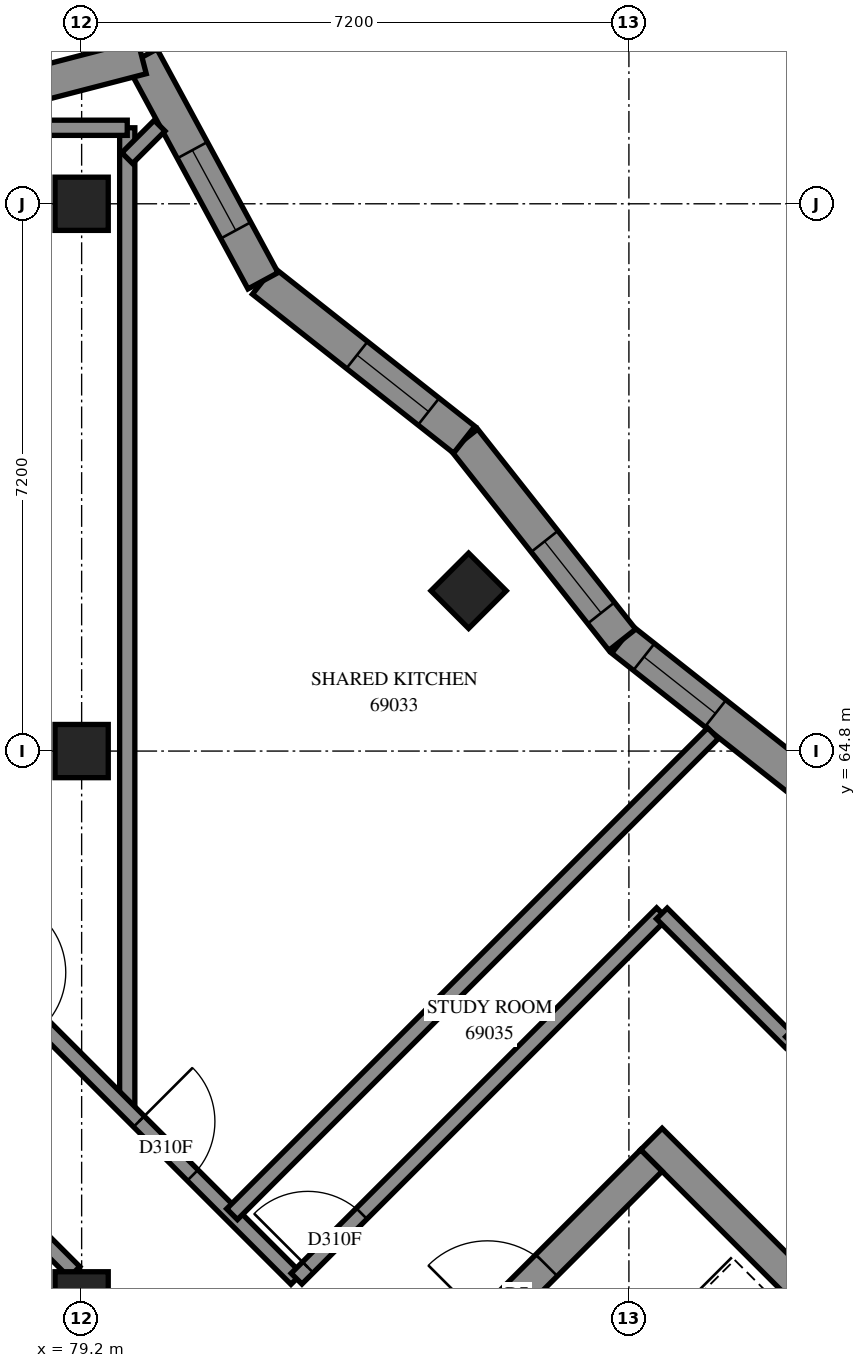
"""IFC4 building model, lengths in metres.
Left out: names, types, materials, properties, quantities, classifications, styles, units other than length and angle.
Written with IfcOpenShell. Run it as: python <this file> out.ifc"""

import sys

from ifc_helpers import new_model, si_unit, direction, frame, frame_2d, origin, origin_2d, place, context, subcontext, project, spatial, polyline, rectangle, outline, extrude, element, fill, save


model = new_model("IFC4")
c1 = context("Model", 3, precision=1e-05, world=origin(), true_north=direction((0.0, 1.0)))
c2 = subcontext(c1, "Body", "Model", "MODEL_VIEW")
j1 = project(units=[si_unit("LENGTHUNIT", "METRE"), si_unit("PLANEANGLEUNIT", "RADIAN")], contexts=[c1])
p1 = place(None, origin())
s1 = spatial("IfcSite", under=j1, at=p1, CompositionType="ELEMENT")
p2 = place(p1, origin())
s2 = spatial("IfcBuilding", under=s1, at=p2, CompositionType="ELEMENT")
p3 = place(p2, frame((0.0, 0.0, 254.0)))
s3 = spatial("IfcBuildingStorey", under=s2, at=p3, CompositionType="ELEMENT", Elevation=254.0)
for number, where, z_axis, x_axis in (
    (1, (79.2, 57.6, 0.0), (0.0, 0.0, 1.0), (1.0, 0.0, 0.0)),
    (2, (79.2, 64.8, 0.0), (0.0, 0.0, 1.0), (1.0, 0.0, 0.0)),
    (3, (79.2, 72.0, 0.0), (0.0, 0.0, 1.0), (1.0, 0.0, 0.0)),
    (4, (84.291, 66.909, 0.0), (0.0, 0.0, 1.0), (0.707, -0.707, 0.0)),
):
    element("IfcColumn", number, at=place(p3, frame(where, z_axis=z_axis, x_axis=x_axis)), inside=s3, PredefinedType="COLUMN", context=c2, shape_type="SweptSolid", body=[
        extrude(rectangle(XDim=0.7, YDim=0.7, at=origin_2d()), origin(), (0.0, 0.0, 1.0), 3.1),
    ])
p4 = place(p3, frame((86.695, 59.696, -0.3), z_axis=(0.0, 0.0, 1.0), x_axis=(0.7071100706, -0.7071034917, 0.0)))
e5 = element("IfcWall", 5, at=p4, inside=s3, PredefinedType="SHEAR", context=c2, shape_type="SweptSolid", body=[
    extrude(rectangle(XDim=15.2, YDim=0.4, at=frame_2d((7.6, 0.0))), origin(), (0.0, 0.0, 1.0), 2.7),
])
p5 = place(p4, frame((10.4, 0.0, 0.3)))
e6 = element("IfcOpeningElement", 6, at=p5, cuts=e5, PredefinedType="OPENING", context=c2, shape_type="SweptSolid", body=[
    extrude(rectangle(XDim=0.8, YDim=2.1, at=frame_2d((0.4, 1.05))), frame((0.0, 0.21, 0.0), z_axis=(0.0, -1.0, 0.0), x_axis=(1.0, 0.0, 0.0)), (0.0, 0.0, 1.0), 0.42),
])
p6 = place(p3, frame((76.513, 49.231, -0.3), z_axis=(0.0, 0.0, 1.0), x_axis=(0.7071067812, 0.7071067812, 0.0)))
e7 = element("IfcWall", 7, at=p6, inside=s3, PredefinedType="SHEAR", context=c2, shape_type="SweptSolid", body=[
    extrude(rectangle(XDim=14.4, YDim=0.4, at=frame_2d((7.2, 0.0))), origin(), (0.0, 0.0, 1.0), 2.7),
])
p7 = place(p6, frame((4.55, 0.0, 0.3)))
e8 = element("IfcOpeningElement", 8, at=p7, cuts=e7, PredefinedType="OPENING", context=c2, shape_type="SweptSolid", body=[
    extrude(rectangle(XDim=1.1, YDim=2.1, at=frame_2d((0.55, 1.05))), frame((0.0, 0.21, 0.0), z_axis=(0.0, -1.0, 0.0), x_axis=(1.0, 0.0, 0.0)), (0.0, 0.0, 1.0), 0.42),
])
p8 = place(p6, frame((11.35, 0.0, 0.3)))
e9 = element("IfcOpeningElement", 9, at=p8, cuts=e7, PredefinedType="OPENING", context=c2, shape_type="SweptSolid", body=[
    extrude(rectangle(XDim=1.1, YDim=2.1, at=frame_2d((0.55, 1.05))), frame((0.0, 0.21, 0.0), z_axis=(0.0, -1.0, 0.0), x_axis=(1.0, 0.0, 0.0)), (0.0, 0.0, 1.0), 0.42),
])
p9 = place(p3, frame((88.944, 64.186, 0.0), z_axis=(0.0, 0.0, 1.0), x_axis=(-0.7847316147, 0.6198356984, 0.0)))
e10 = element("IfcWall", 10, at=p9, inside=s3, PredefinedType="SOLIDWALL", context=c2, shape_type="SweptSolid", body=[
    extrude(outline(polyline([(-0.026, -0.225), (3.327, -0.225), (3.38, 0.225), (0.026, 0.225), (-0.026, -0.225)])), origin(), (0.0, 0.0, 1.0), 3.1),
])
p10 = place(p9, frame((1.79, 0.0, 0.45)))
e11 = element("IfcOpeningElement", 11, at=p10, cuts=e10, PredefinedType="OPENING", context=c2, shape_type="SweptSolid", body=[
    extrude(rectangle(XDim=1.2, YDim=2.55, at=frame_2d((0.6, 1.275))), frame((0.0, 0.235, 0.0), z_axis=(0.0, -1.0, 0.0), x_axis=(1.0, 0.0, 0.0)), (0.0, 0.0, 1.0), 0.47),
])
p11 = place(p3, frame((86.312, 66.264, 0.0), z_axis=(0.0, 0.0, 1.0), x_axis=(-0.6198356984, 0.7847316147, 0.0)))
e12 = element("IfcWall", 12, at=p11, inside=s3, PredefinedType="SOLIDWALL", context=c2, shape_type="SweptSolid", body=[
    extrude(outline(polyline([(0.026, -0.225), (3.38, -0.225), (3.327, 0.225), (-0.026, 0.225), (0.026, -0.225)])), origin(), (0.0, 0.0, 1.0), 3.1),
])
p12 = place(p11, frame((0.449, 0.0, 0.45)))
e13 = element("IfcOpeningElement", 13, at=p12, cuts=e12, PredefinedType="OPENING", context=c2, shape_type="SweptSolid", body=[
    extrude(rectangle(XDim=1.2, YDim=2.55, at=frame_2d((0.6, 1.275))), frame((0.0, 0.235, 0.0), z_axis=(0.0, -1.0, 0.0), x_axis=(1.0, 0.0, 0.0)), (0.0, 0.0, 1.0), 0.47),
])
p13 = place(p3, frame((84.234, 68.896, 0.0), z_axis=(0.0, 0.0, 1.0), x_axis=(-0.7847347819, 0.6198316885, 0.0)))
e14 = element("IfcWall", 14, at=p13, inside=s3, PredefinedType="SOLIDWALL", context=c2, shape_type="SweptSolid", body=[
    extrude(outline(polyline([(-0.026, -0.225), (3.327, -0.225), (3.42, 0.225), (0.026, 0.225), (-0.026, -0.225)])), origin(), (0.0, 0.0, 1.0), 3.1),
])
p14 = place(p13, frame((0.598, 0.0, 0.45)))
e15 = element("IfcOpeningElement", 15, at=p14, cuts=e14, PredefinedType="OPENING", context=c2, shape_type="SweptSolid", body=[
    extrude(rectangle(XDim=1.2, YDim=2.55, at=frame_2d((0.6, 1.275))), frame((0.0, 0.235, 0.0), z_axis=(0.0, -1.0, 0.0), x_axis=(1.0, 0.0, 0.0)), (0.0, 0.0, 1.0), 0.47),
])
p15 = place(p3, frame((81.586, 70.987, 0.0), z_axis=(0.0, 0.0, 1.0), x_axis=(-0.4760809047, 0.8794014852, 0.0)))
e16 = element("IfcWall", 16, at=p15, inside=s3, PredefinedType="SOLIDWALL", context=c2, shape_type="SweptSolid", body=[
    extrude(outline(polyline([(0.046, -0.225), (3.521, -0.225), (3.169, 0.225), (-0.046, 0.225), (0.046, -0.225)])), origin(), (0.0, 0.0, 1.0), 3.1),
])
p16 = place(p15, frame((0.754, 0.0, 0.45)))
e17 = element("IfcOpeningElement", 17, at=p16, cuts=e16, PredefinedType="OPENING", context=c2, shape_type="SweptSolid", body=[
    extrude(rectangle(XDim=1.2, YDim=2.55, at=frame_2d((0.6, 1.275))), frame((0.0, 0.235, 0.0), z_axis=(0.0, -1.0, 0.0), x_axis=(1.0, 0.0, 0.0)), (0.0, 0.0, 1.0), 0.47),
])
p17 = place(p3, frame((79.994, 73.929, 0.0), z_axis=(0.0, 0.0, 1.0), x_axis=(-0.9679820268, -0.2510195126, 0.0)))
e18 = element("IfcWall", 18, at=p17, inside=s3, PredefinedType="SOLIDWALL", context=c2, shape_type="SweptSolid", body=[
    extrude(outline(polyline([(-0.176, -0.225), (3.772, -0.225), (3.853, 0.225), (0.176, 0.225), (-0.176, -0.225)])), origin(), (0.0, 0.0, 1.0), 3.1),
])
p18 = place(p17, frame((1.466, 0.0, 0.45)))
e19 = element("IfcOpeningElement", 19, at=p18, cuts=e18, PredefinedType="OPENING", context=c2, shape_type="SweptSolid", body=[
    extrude(rectangle(XDim=1.2, YDim=2.55, at=frame_2d((0.6, 1.275))), frame((0.0, 0.235, 0.0), z_axis=(0.0, -1.0, 0.0), x_axis=(1.0, 0.0, 0.0)), (0.0, 0.0, 1.0), 0.47),
])
p19 = place(p3, frame((79.8, 60.086, 0.0), z_axis=(0.0, 0.0, 1.0), x_axis=(0.0, 1.0, 0.0)))
e20 = element("IfcWall", 20, at=p19, inside=s3, PredefinedType="PARTITIONING", context=c2, shape_type="SweptSolid", body=[
    extrude(rectangle(XDim=12.914, YDim=0.2, at=frame_2d((6.457, 0.0))), origin(), (0.0, 0.0, 1.0), 3.1),
])
p20 = place(p3, frame((74.397, 65.483, 0.0), z_axis=(0.0, 0.0, 1.0), x_axis=(0.7071067812, -0.7071067812, 0.0)))
e21 = element("IfcWall", 21, at=p20, inside=s3, PredefinedType="PARTITIONING", context=c2, shape_type="SweptSolid", body=[
    extrude(rectangle(XDim=10.788, YDim=0.2, at=frame_2d((5.394, 0.0))), origin(), (0.0, 0.0, 1.0), 3.1),
])
p21 = place(p20, frame((5.083, 0.0, 0.0)))
e22 = element("IfcOpeningElement", 22, at=p21, cuts=e21, PredefinedType="OPENING", context=c2, shape_type="SweptSolid", body=[
    extrude(rectangle(XDim=1.0, YDim=2.1, at=frame_2d((0.5, 1.05))), frame((0.0, 0.11, 0.0), z_axis=(0.0, -1.0, 0.0), x_axis=(1.0, 0.0, 0.0)), (0.0, 0.0, 1.0), 0.22),
])
p22 = place(p20, frame((7.858, 0.0, 0.0)))
e23 = element("IfcOpeningElement", 23, at=p22, cuts=e21, PredefinedType="OPENING", context=c2, shape_type="SweptSolid", body=[
    extrude(rectangle(XDim=1.0, YDim=2.1, at=frame_2d((0.5, 1.05))), frame((0.0, 0.11, 0.0), z_axis=(0.0, -1.0, 0.0), x_axis=(1.0, 0.0, 0.0)), (0.0, 0.0, 1.0), 0.22),
])
p23 = place(p3, frame((81.179, 58.707, 0.0), z_axis=(0.0, 0.0, 1.0), x_axis=(0.7071123688, 0.7071011936, 0.0)))
e24 = element("IfcWall", 24, at=p23, inside=s3, PredefinedType="PARTITIONING", context=c2, shape_type="SweptSolid", body=[
    extrude(rectangle(XDim=8.948, YDim=0.2, at=frame_2d((4.474, 0.0))), origin(), (0.0, 0.0, 1.0), 3.1),
])
p24 = place(p3, frame((82.028, 57.858, 0.0), z_axis=(0.0, 0.0, 1.0), x_axis=(0.7071067812, 0.7071067812, 0.0)))
e25 = element("IfcWall", 25, at=p24, inside=s3, PredefinedType="PARTITIONING", context=c2, shape_type="SweptSolid", body=[
    extrude(rectangle(XDim=6.8, YDim=0.2, at=frame_2d((3.4, 0.0))), origin(), (0.0, 0.0, 1.0), 3.1),
])
p25 = place(p24, frame((0.211, 0.0, 0.0)))
e26 = element("IfcOpeningElement", 26, at=p25, cuts=e25, PredefinedType="OPENING", context=c2, shape_type="SweptSolid", body=[
    extrude(rectangle(XDim=1.0, YDim=2.1, at=frame_2d((0.5, 1.05))), frame((0.0, 0.11, 0.0), z_axis=(0.0, -1.0, 0.0), x_axis=(1.0, 0.0, 0.0)), (0.0, 0.0, 1.0), 0.22),
])
p26 = place(p3, frame((88.537, 60.973, 0.0), z_axis=(0.0, 0.0, 1.0), x_axis=(0.7071067812, -0.7071067812, 0.0)))
e27 = element("IfcWall", 27, at=p26, inside=s3, PredefinedType="PARTITIONING", context=c2, shape_type="SweptSolid", body=[
    extrude(rectangle(XDim=6.401, YDim=0.2, at=frame_2d((3.2, 0.0))), origin(), (0.0, 0.0, 1.0), 3.1),
])
p27 = place(p26, frame((0.569, 0.0, 0.0)))
e28 = element("IfcOpeningElement", 28, at=p27, cuts=e27, PredefinedType="OPENING", context=c2, shape_type="SweptSolid", body=[
    extrude(rectangle(XDim=0.9, YDim=2.1, at=frame_2d((0.45, 1.05))), frame((0.0, 0.11, 0.0), z_axis=(0.0, -1.0, 0.0), x_axis=(1.0, 0.0, 0.0)), (0.0, 0.0, 1.0), 0.22),
])
p28 = place(p3, frame((77.358, 73.0, 0.0), z_axis=(0.0, 0.0, 1.0), x_axis=(1.0, 0.0, 0.0)))
e29 = element("IfcWall", 29, at=p28, inside=s3, PredefinedType="PARTITIONING", context=c2, shape_type="SweptSolid", body=[
    extrude(rectangle(XDim=2.442, YDim=0.2, at=frame_2d((1.221, 0.0))), origin(), (0.0, 0.0, 1.0), 3.1),
])
p29 = place(p3, frame((86.833, 62.663, 0.0), z_axis=(0.0, 0.0, 1.0), x_axis=(0.7075233388, -0.706689978, 0.0)))
e30 = element("IfcWall", 30, at=p29, inside=s3, PredefinedType="PARTITIONING", context=c2, shape_type="SweptSolid", body=[
    extrude(rectangle(XDim=2.4, YDim=0.2, at=frame_2d((1.2, 0.0))), origin(), (0.0, 0.0, 1.0), 3.1),
])
p30 = place(p3, frame((88.534, 60.971, 0.0), z_axis=(0.0, 0.0, 1.0), x_axis=(0.7071067812, 0.7071067812, 0.0)))
e31 = element("IfcWall", 31, at=p30, inside=s3, PredefinedType="PARTITIONING", context=c2, shape_type="SweptSolid", body=[
    extrude(rectangle(XDim=0.704, YDim=0.2, at=frame_2d((0.352, 0.0))), origin(), (0.0, 0.0, 1.0), 3.1),
])
p31 = place(p3, frame((78.655, 58.397, 0.0), z_axis=(0.0, 0.0, 1.0), x_axis=(0.7071067812, -0.7071067812, 0.0)))
e32 = element("IfcWall", 32, at=p31, inside=s3, PredefinedType="PARTITIONING", context=c2, shape_type="SweptSolid", body=[
    extrude(rectangle(XDim=0.636, YDim=0.2, at=frame_2d((0.318, 0.0))), origin(), (0.0, 0.0, 1.0), 3.1),
])
p32 = place(p3, frame((79.799, 72.601, 0.0), z_axis=(0.0, 0.0, 1.0), x_axis=(0.707023909, 0.7071896436, 0.0)))
e33 = element("IfcWall", 33, at=p32, inside=s3, PredefinedType="PARTITIONING", context=c2, shape_type="SweptSolid", body=[
    extrude(rectangle(XDim=0.603, YDim=0.2, at=frame_2d((0.302, 0.0))), origin(), (0.0, 0.0, 1.0), 3.1),
])
p33 = place(p10, origin())
e34 = element("IfcWindow", 34, at=p33, inside=s3, PartitioningType="SINGLE_PANEL", PredefinedType="WINDOW", context=c2, shape_type="SweptSolid", body=[
    extrude(rectangle(XDim=1.2, YDim=2.55, at=frame_2d((0.6, 1.275))), frame((0.0, 0.205, 0.0), z_axis=(0.0, -1.0, 0.0), x_axis=(1.0, 0.0, 0.0)), (0.0, 0.0, 1.0), 0.06),
])
fill(e11, e34)
p34 = place(p12, origin())
e35 = element("IfcWindow", 35, at=p34, inside=s3, PartitioningType="SINGLE_PANEL", PredefinedType="WINDOW", context=c2, shape_type="SweptSolid", body=[
    extrude(rectangle(XDim=1.2, YDim=2.55, at=frame_2d((0.6, 1.275))), frame((0.0, 0.205, 0.0), z_axis=(0.0, -1.0, 0.0), x_axis=(1.0, 0.0, 0.0)), (0.0, 0.0, 1.0), 0.06),
])
fill(e13, e35)
p35 = place(p14, origin())
e36 = element("IfcWindow", 36, at=p35, inside=s3, PartitioningType="SINGLE_PANEL", PredefinedType="WINDOW", context=c2, shape_type="SweptSolid", body=[
    extrude(rectangle(XDim=1.2, YDim=2.55, at=frame_2d((0.6, 1.275))), frame((0.0, 0.205, 0.0), z_axis=(0.0, -1.0, 0.0), x_axis=(1.0, 0.0, 0.0)), (0.0, 0.0, 1.0), 0.06),
])
fill(e15, e36)
p36 = place(p16, origin())
e37 = element("IfcWindow", 37, at=p36, inside=s3, PartitioningType="SINGLE_PANEL", PredefinedType="WINDOW", context=c2, shape_type="SweptSolid", body=[
    extrude(rectangle(XDim=1.2, YDim=2.55, at=frame_2d((0.6, 1.275))), frame((0.0, 0.205, 0.0), z_axis=(0.0, -1.0, 0.0), x_axis=(1.0, 0.0, 0.0)), (0.0, 0.0, 1.0), 0.06),
])
fill(e17, e37)
p37 = place(p8, origin())
e38 = element("IfcDoor", 38, at=p37, inside=s3, OperationType="SINGLE_SWING_LEFT", PredefinedType="DOOR", context=c2, shape_type="SweptSolid", body=[
    extrude(rectangle(XDim=1.1, YDim=2.1, at=frame_2d((0.55, 1.05))), frame((0.0, 0.025, 0.0), z_axis=(0.0, -1.0, 0.0), x_axis=(1.0, 0.0, 0.0)), (0.0, 0.0, 1.0), 0.05),
])
fill(e9, e38)
p38 = place(p22, origin())
e39 = element("IfcDoor", 39, at=p38, inside=s3, OperationType="SINGLE_SWING_LEFT", PredefinedType="DOOR", context=c2, shape_type="SweptSolid", body=[
    extrude(rectangle(XDim=1.0, YDim=2.1, at=frame_2d((0.5, 1.05))), frame((0.0, 0.025, 0.0), z_axis=(0.0, -1.0, 0.0), x_axis=(1.0, 0.0, 0.0)), (0.0, 0.0, 1.0), 0.05),
])
fill(e23, e39)
p39 = place(p25, origin())
e40 = element("IfcDoor", 40, at=p39, inside=s3, OperationType="SINGLE_SWING_RIGHT", PredefinedType="DOOR", context=c2, shape_type="SweptSolid", body=[
    extrude(rectangle(XDim=1.0, YDim=2.1, at=frame_2d((0.5, 1.05))), frame((0.0, 0.025, 0.0), z_axis=(0.0, -1.0, 0.0), x_axis=(1.0, 0.0, 0.0)), (0.0, 0.0, 1.0), 0.05),
])
fill(e26, e40)
save(model, sys.argv[1])
